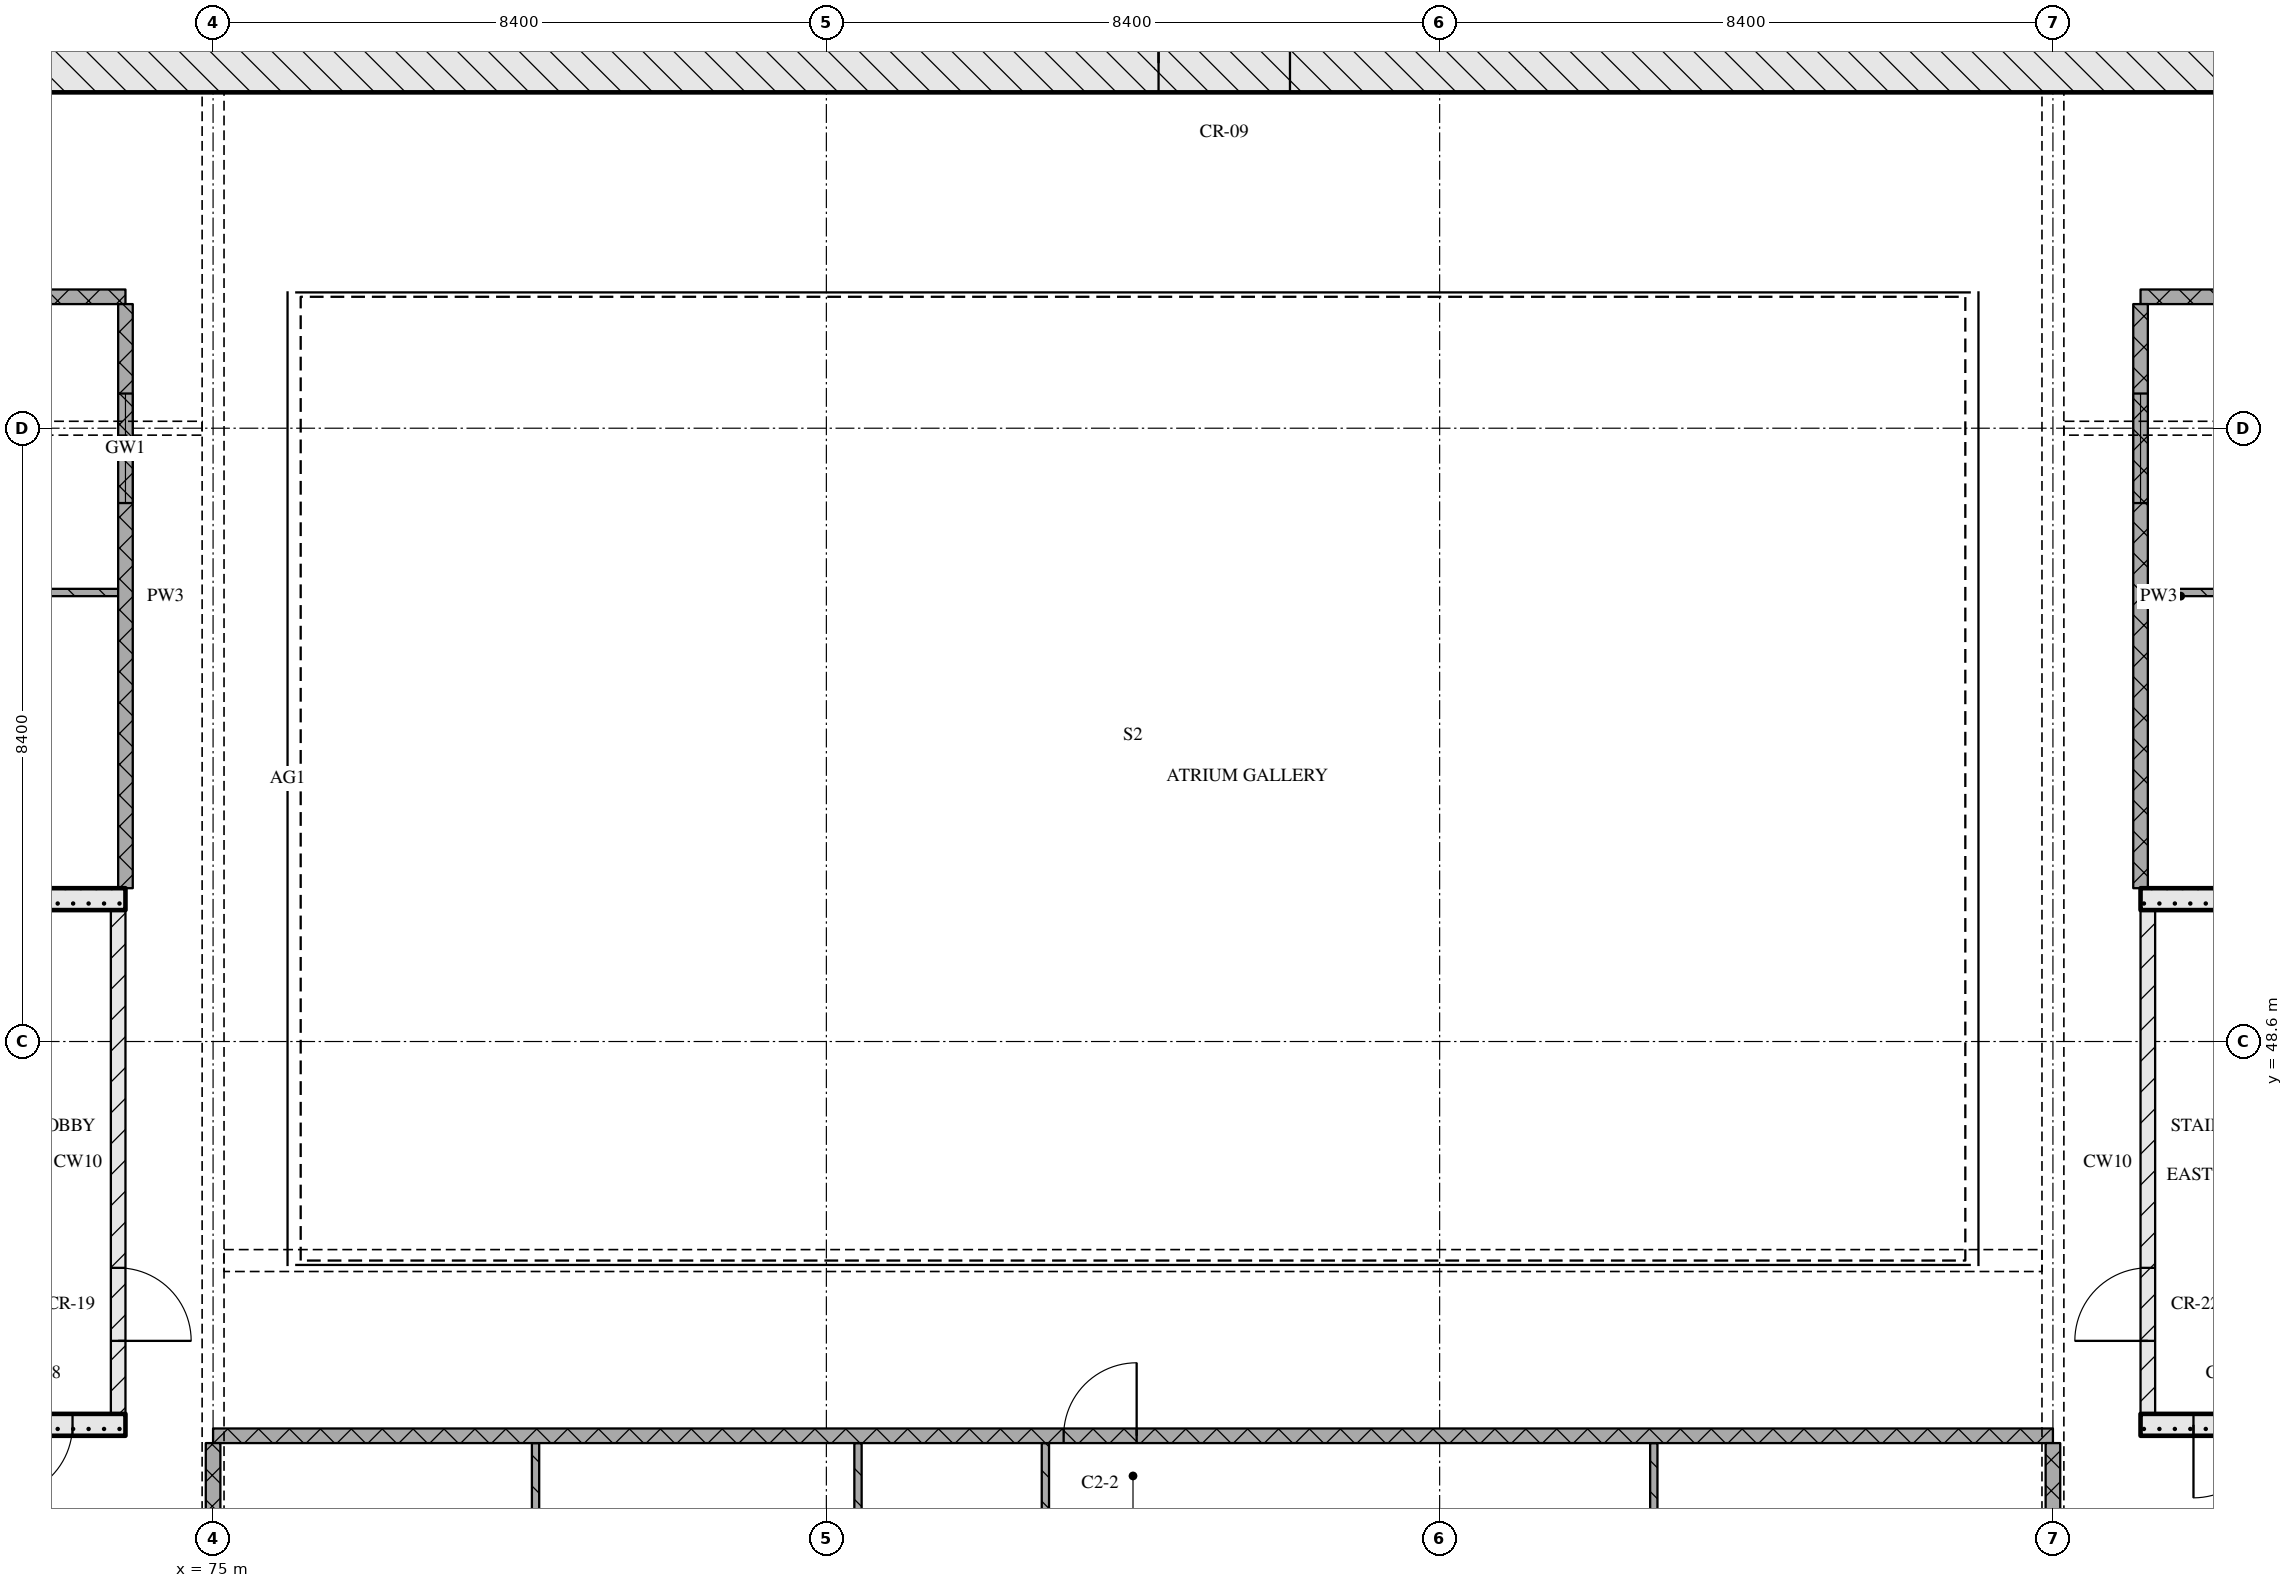
"""IFC4 building model, lengths in metres.
Left out: names, types, materials, properties, quantities, classifications, styles, units other than length and angle.
Written with IfcOpenShell. Run it as: python <this file> out.ifc"""

import sys

from ifc_helpers import new_model, si_unit, direction, frame, frame_2d, origin, place, context, subcontext, project, spatial, rectangle, extrude, element, fill, save


model = new_model("IFC4")
c1 = context("Model", 3, precision=1e-05, world=origin(), true_north=direction((0.0, 1.0)))
c2 = subcontext(c1, "Body", "Model", "MODEL_VIEW")
j1 = project(units=[si_unit("LENGTHUNIT", "METRE"), si_unit("PLANEANGLEUNIT", "RADIAN")], contexts=[c1])
p1 = place(None, origin())
s1 = spatial("IfcSite", under=j1, at=p1, CompositionType="ELEMENT")
p2 = place(p1, origin())
s2 = spatial("IfcBuilding", under=s1, at=p2, CompositionType="ELEMENT")
p3 = place(p2, frame((0.0, 0.0, 161.85)))
s3 = spatial("IfcBuildingStorey", under=s2, at=p3, CompositionType="ELEMENT", Elevation=161.85)
p4 = place(p3, frame((67.0, 62.0, 0.0), z_axis=(0.0, 0.0, 1.0), x_axis=(1.0, 0.0, 0.0)))
e1 = element("IfcWall", 1, at=p4, inside=s3, PredefinedType="SOLIDWALL", context=c2, shape_type="SweptSolid", body=[
    extrude(rectangle(XDim=41.2, YDim=0.8, at=frame_2d((20.6, 0.0))), origin(), (0.0, 0.0, 1.0), 3.32),
])
p5 = place(p4, frame((20.95, 0.0, 0.0)))
e2 = element("IfcOpeningElement", 2, at=p5, cuts=e1, PredefinedType="OPENING", context=c2, shape_type="SweptSolid", body=[
    extrude(rectangle(XDim=1.8, YDim=2.1, at=frame_2d((0.9, 1.05))), frame((0.0, 0.41, 0.0), z_axis=(0.0, -1.0, 0.0), x_axis=(1.0, 0.0, 0.0)), (0.0, 0.0, 1.0), 0.82),
])
p6 = place(p3, frame((68.2, 43.35, 0.0), z_axis=(0.0, 0.0, 1.0), x_axis=(1.0, 0.0, 0.0)))
e3 = element("IfcWall", 3, at=p6, inside=s3, PredefinedType="SOLIDWALL", context=c2, shape_type="SweptSolid", body=[
    extrude(rectangle(XDim=5.6, YDim=0.3, at=frame_2d((2.8, 0.0))), origin(), (0.0, 0.0, 1.0), 3.32),
])
p7 = place(p6, frame((3.875, 0.0, 0.0)))
e4 = element("IfcOpeningElement", 4, at=p7, cuts=e3, PredefinedType="OPENING", context=c2, shape_type="SweptSolid", body=[
    extrude(rectangle(XDim=1.0, YDim=2.1, at=frame_2d((0.5, 1.05))), frame((0.0, 0.16, 0.0), z_axis=(0.0, -1.0, 0.0), x_axis=(1.0, 0.0, 0.0)), (0.0, 0.0, 1.0), 0.32),
])
p8 = place(p3, frame((73.7, 43.5, 0.0), z_axis=(0.0, 0.0, 1.0), x_axis=(0.0, 1.0, 0.0)))
e5 = element("IfcWall", 5, at=p8, inside=s3, PredefinedType="PARTITIONING", context=c2, shape_type="SweptSolid", body=[
    extrude(rectangle(XDim=6.9, YDim=0.2, at=frame_2d((3.45, 0.0))), origin(), (0.0, 0.0, 1.0), 3.32),
])
p9 = place(p8, frame((1.0, 0.0, 0.0)))
e6 = element("IfcOpeningElement", 6, at=p9, cuts=e5, PredefinedType="OPENING", context=c2, shape_type="SweptSolid", body=[
    extrude(rectangle(XDim=1.0, YDim=2.1, at=frame_2d((0.5, 1.05))), frame((0.0, 0.11, 0.0), z_axis=(0.0, -1.0, 0.0), x_axis=(1.0, 0.0, 0.0)), (0.0, 0.0, 1.0), 0.22),
])
p10 = place(p3, frame((68.2, 50.55, 0.0), z_axis=(0.0, 0.0, 1.0), x_axis=(1.0, 0.0, 0.0)))
e7 = element("IfcWall", 7, at=p10, inside=s3, PredefinedType="SOLIDWALL", context=c2, shape_type="SweptSolid", body=[
    extrude(rectangle(XDim=5.6, YDim=0.3, at=frame_2d((2.8, 0.0))), origin(), (0.0, 0.0, 1.0), 3.32),
])
p11 = place(p3, frame((101.4, 43.35, 0.0), z_axis=(0.0, 0.0, 1.0), x_axis=(1.0, 0.0, 0.0)))
e8 = element("IfcWall", 8, at=p11, inside=s3, PredefinedType="SOLIDWALL", context=c2, shape_type="SweptSolid", body=[
    extrude(rectangle(XDim=5.6, YDim=0.3, at=frame_2d((2.8, 0.0))), origin(), (0.0, 0.0, 1.0), 3.32),
])
p12 = place(p11, frame((0.725, 0.0, 0.0)))
e9 = element("IfcOpeningElement", 9, at=p12, cuts=e8, PredefinedType="OPENING", context=c2, shape_type="SweptSolid", body=[
    extrude(rectangle(XDim=1.0, YDim=2.1, at=frame_2d((0.5, 1.05))), frame((0.0, 0.16, 0.0), z_axis=(0.0, -1.0, 0.0), x_axis=(1.0, 0.0, 0.0)), (0.0, 0.0, 1.0), 0.32),
])
p13 = place(p3, frame((101.5, 43.5, 0.0), z_axis=(0.0, 0.0, 1.0), x_axis=(0.0, 1.0, 0.0)))
e10 = element("IfcWall", 10, at=p13, inside=s3, PredefinedType="PARTITIONING", context=c2, shape_type="SweptSolid", body=[
    extrude(rectangle(XDim=6.9, YDim=0.2, at=frame_2d((3.45, 0.0))), origin(), (0.0, 0.0, 1.0), 3.32),
])
p14 = place(p13, frame((1.0, 0.0, 0.0)))
e11 = element("IfcOpeningElement", 11, at=p14, cuts=e10, PredefinedType="OPENING", context=c2, shape_type="SweptSolid", body=[
    extrude(rectangle(XDim=1.0, YDim=2.1, at=frame_2d((0.5, 1.05))), frame((0.0, 0.11, 0.0), z_axis=(0.0, -1.0, 0.0), x_axis=(1.0, 0.0, 0.0)), (0.0, 0.0, 1.0), 0.22),
])
p15 = place(p3, frame((101.4, 50.55, 0.0), z_axis=(0.0, 0.0, 1.0), x_axis=(1.0, 0.0, 0.0)))
e12 = element("IfcWall", 12, at=p15, inside=s3, PredefinedType="SOLIDWALL", context=c2, shape_type="SweptSolid", body=[
    extrude(rectangle(XDim=5.6, YDim=0.3, at=frame_2d((2.8, 0.0))), origin(), (0.0, 0.0, 1.0), 3.32),
])
p16 = place(p3, frame((100.2, 43.2, 0.0), z_axis=(0.0, 0.0, 1.0), x_axis=(-1.0, 0.0, 0.0)))
e13 = element("IfcWall", 13, at=p16, inside=s3, PredefinedType="PARTITIONING", context=c2, shape_type="SweptSolid", body=[
    extrude(rectangle(XDim=25.2, YDim=0.2, at=frame_2d((12.6, 0.0))), origin(), (0.0, 0.0, 1.0), 3.32),
])
p17 = place(p16, frame((12.55, 0.0, 0.0)))
e14 = element("IfcOpeningElement", 14, at=p17, cuts=e13, PredefinedType="OPENING", context=c2, shape_type="SweptSolid", body=[
    extrude(rectangle(XDim=1.0, YDim=2.1, at=frame_2d((0.5, 1.05))), frame((0.0, 0.11, 0.0), z_axis=(0.0, -1.0, 0.0), x_axis=(1.0, 0.0, 0.0)), (0.0, 0.0, 1.0), 0.22),
])
p18 = place(p3, frame((67.5, 54.75, 0.0), z_axis=(0.0, 0.0, 1.0), x_axis=(1.0, 0.0, 0.0)))
e15 = element("IfcWall", 15, at=p18, inside=s3, PredefinedType="PARTITIONING", context=c2, shape_type="SweptSolid", body=[
    extrude(rectangle(XDim=6.2, YDim=0.1, at=frame_2d((3.1, 0.0))), origin(), (0.0, 0.0, 1.0), 3.32),
])
p19 = place(p3, frame((101.5, 54.75, 0.0), z_axis=(0.0, 0.0, 1.0), x_axis=(1.0, 0.0, 0.0)))
e16 = element("IfcWall", 16, at=p19, inside=s3, PredefinedType="PARTITIONING", context=c2, shape_type="SweptSolid", body=[
    extrude(rectangle(XDim=4.4, YDim=0.1, at=frame_2d((2.2, 0.0))), origin(), (0.0, 0.0, 1.0), 3.32),
])
p20 = place(p19, frame((1.7, 0.0, 0.0)))
e17 = element("IfcOpeningElement", 17, at=p20, cuts=e16, PredefinedType="OPENING", context=c2, shape_type="SweptSolid", body=[
    extrude(rectangle(XDim=0.9, YDim=2.1, at=frame_2d((0.45, 1.05))), frame((0.0, 0.06, 0.0), z_axis=(0.0, -1.0, 0.0), x_axis=(1.0, 0.0, 0.0)), (0.0, 0.0, 1.0), 0.12),
])
for number, where, z_axis, x_axis in (
    (18, (63.0, 58.8, 0.0), (0.0, 0.0, 1.0), (1.0, 0.0, 0.0)),
    (19, (101.4, 58.8, 0.0), (0.0, 0.0, 1.0), (1.0, 0.0, 0.0)),
):
    element("IfcWall", number, at=place(p3, frame(where, z_axis=z_axis, x_axis=x_axis)), inside=s3, PredefinedType="PARTITIONING", context=c2, shape_type="SweptSolid", body=[
        extrude(rectangle(XDim=10.8, YDim=0.2, at=frame_2d((5.4, 0.0))), origin(), (0.0, 0.0, 1.0), 3.32),
    ])
p21 = place(p3, frame((73.8, 58.7, 0.0), z_axis=(0.0, 0.0, 1.0), x_axis=(0.0, -1.0, 0.0)))
e20 = element("IfcWall", 20, at=p21, inside=s3, PredefinedType="PARTITIONING", context=c2, shape_type="SweptSolid", body=[
    extrude(rectangle(XDim=8.0, YDim=0.2, at=frame_2d((4.0, 0.0))), origin(), (0.0, 0.0, 1.0), 3.32),
])
p22 = place(p21, frame((1.225, 0.0, 0.9)))
e21 = element("IfcOpeningElement", 21, at=p22, cuts=e20, PredefinedType="OPENING", context=c2, shape_type="SweptSolid", body=[
    extrude(rectangle(XDim=1.5, YDim=1.5, at=frame_2d((0.75, 0.75))), frame((0.0, 0.11, 0.0), z_axis=(0.0, -1.0, 0.0), x_axis=(1.0, 0.0, 0.0)), (0.0, 0.0, 1.0), 0.22),
])
p23 = place(p3, frame((75.0, 43.1, 0.0), z_axis=(0.0, 0.0, 1.0), x_axis=(0.0, -1.0, 0.0)))
e22 = element("IfcWall", 22, at=p23, inside=s3, PredefinedType="PARTITIONING", context=c2, shape_type="SweptSolid", body=[
    extrude(rectangle(XDim=2.2, YDim=0.2, at=frame_2d((1.1, 0.0))), origin(), (0.0, 0.0, 1.0), 2.43),
])
for number, where, z_axis, x_axis in (
    (23, (79.417, 43.1, 0.0), (0.0, 0.0, 1.0), (0.0, -1.0, 0.0)),
    (24, (83.833, 43.1, 0.0), (0.0, 0.0, 1.0), (0.0, -1.0, 0.0)),
    (25, (86.4, 43.1, 0.0), (0.0, 0.0, 1.0), (0.0, -1.0, 0.0)),
    (26, (94.733, 43.1, 0.0), (0.0, 0.0, 1.0), (0.0, -1.0, 0.0)),
):
    element("IfcWall", number, at=place(p3, frame(where, z_axis=z_axis, x_axis=x_axis)), inside=s3, PredefinedType="PARTITIONING", context=c2, shape_type="SweptSolid", body=[
        extrude(rectangle(XDim=5.85, YDim=0.1, at=frame_2d((2.925, 0.0))), origin(), (0.0, 0.0, 1.0), 3.32),
    ])
p24 = place(p3, frame((100.2, 43.1, 0.0), z_axis=(0.0, 0.0, 1.0), x_axis=(0.0, -1.0, 0.0)))
e27 = element("IfcWall", 27, at=p24, inside=s3, PredefinedType="PARTITIONING", context=c2, shape_type="SweptSolid", body=[
    extrude(rectangle(XDim=2.2, YDim=0.2, at=frame_2d((1.1, 0.0))), origin(), (0.0, 0.0, 1.0), 2.43),
])
p25 = place(p3, frame((101.4, 58.7, 0.0), z_axis=(0.0, 0.0, 1.0), x_axis=(0.0, -1.0, 0.0)))
e28 = element("IfcWall", 28, at=p25, inside=s3, PredefinedType="PARTITIONING", context=c2, shape_type="SweptSolid", body=[
    extrude(rectangle(XDim=8.0, YDim=0.2, at=frame_2d((4.0, 0.0))), origin(), (0.0, 0.0, 1.0), 3.32),
])
p26 = place(p25, frame((1.225, 0.0, 0.9)))
e29 = element("IfcOpeningElement", 29, at=p26, cuts=e28, PredefinedType="OPENING", context=c2, shape_type="SweptSolid", body=[
    extrude(rectangle(XDim=1.5, YDim=1.5, at=frame_2d((0.75, 0.75))), frame((0.0, 0.11, 0.0), z_axis=(0.0, -1.0, 0.0), x_axis=(1.0, 0.0, 0.0)), (0.0, 0.0, 1.0), 0.22),
])
p27 = place(p5, origin())
e30 = element("IfcDoor", 30, at=p27, inside=s3, OperationType="DOUBLE_DOOR_SINGLE_SWING", PredefinedType="DOOR", context=c2, shape_type="SweptSolid", body=[
    extrude(rectangle(XDim=1.8, YDim=2.1, at=frame_2d((0.9, 1.05))), frame((0.0, 0.025, 0.0), z_axis=(0.0, -1.0, 0.0), x_axis=(1.0, 0.0, 0.0)), (0.0, 0.0, 1.0), 0.05),
])
fill(e2, e30)
p28 = place(p7, origin())
e31 = element("IfcDoor", 31, at=p28, inside=s3, OperationType="SINGLE_SWING_RIGHT", PredefinedType="DOOR", context=c2, shape_type="SweptSolid", body=[
    extrude(rectangle(XDim=1.0, YDim=2.1, at=frame_2d((0.5, 1.05))), frame((0.0, 0.025, 0.0), z_axis=(0.0, -1.0, 0.0), x_axis=(1.0, 0.0, 0.0)), (0.0, 0.0, 1.0), 0.05),
])
fill(e4, e31)
p29 = place(p9, origin())
e32 = element("IfcDoor", 32, at=p29, inside=s3, OperationType="SINGLE_SWING_RIGHT", PredefinedType="DOOR", context=c2, shape_type="SweptSolid", body=[
    extrude(rectangle(XDim=1.0, YDim=2.1, at=frame_2d((0.5, 1.05))), frame((0.0, 0.025, 0.0), z_axis=(0.0, -1.0, 0.0), x_axis=(1.0, 0.0, 0.0)), (0.0, 0.0, 1.0), 0.05),
])
fill(e6, e32)
p30 = place(p12, origin())
e33 = element("IfcDoor", 33, at=p30, inside=s3, OperationType="SINGLE_SWING_RIGHT", PredefinedType="DOOR", context=c2, shape_type="SweptSolid", body=[
    extrude(rectangle(XDim=1.0, YDim=2.1, at=frame_2d((0.5, 1.05))), frame((0.0, 0.025, 0.0), z_axis=(0.0, -1.0, 0.0), x_axis=(1.0, 0.0, 0.0)), (0.0, 0.0, 1.0), 0.05),
])
fill(e9, e33)
p31 = place(p14, origin())
e34 = element("IfcDoor", 34, at=p31, inside=s3, OperationType="SINGLE_SWING_LEFT", PredefinedType="DOOR", context=c2, shape_type="SweptSolid", body=[
    extrude(rectangle(XDim=1.0, YDim=2.1, at=frame_2d((0.5, 1.05))), frame((0.0, 0.025, 0.0), z_axis=(0.0, -1.0, 0.0), x_axis=(1.0, 0.0, 0.0)), (0.0, 0.0, 1.0), 0.05),
])
fill(e11, e34)
p32 = place(p17, origin())
e35 = element("IfcDoor", 35, at=p32, inside=s3, OperationType="SINGLE_SWING_RIGHT", PredefinedType="DOOR", context=c2, shape_type="SweptSolid", body=[
    extrude(rectangle(XDim=1.0, YDim=2.1, at=frame_2d((0.5, 1.05))), frame((0.0, 0.025, 0.0), z_axis=(0.0, -1.0, 0.0), x_axis=(1.0, 0.0, 0.0)), (0.0, 0.0, 1.0), 0.05),
])
fill(e14, e35)
p33 = place(p22, origin())
e36 = element("IfcWindow", 36, at=p33, inside=s3, PartitioningType="SINGLE_PANEL", PredefinedType="WINDOW", context=c2, shape_type="SweptSolid", body=[
    extrude(rectangle(XDim=1.5, YDim=1.5, at=frame_2d((0.75, 0.75))), frame((0.0, 0.03, 0.0), z_axis=(0.0, -1.0, 0.0), x_axis=(1.0, 0.0, 0.0)), (0.0, 0.0, 1.0), 0.06),
])
fill(e21, e36)
p34 = place(p26, origin())
e37 = element("IfcWindow", 37, at=p34, inside=s3, PartitioningType="SINGLE_PANEL", PredefinedType="WINDOW", context=c2, shape_type="SweptSolid", body=[
    extrude(rectangle(XDim=1.5, YDim=1.5, at=frame_2d((0.75, 0.75))), frame((0.0, 0.03, 0.0), z_axis=(0.0, -1.0, 0.0), x_axis=(1.0, 0.0, 0.0)), (0.0, 0.0, 1.0), 0.06),
])
fill(e29, e37)
save(model, sys.argv[1])
